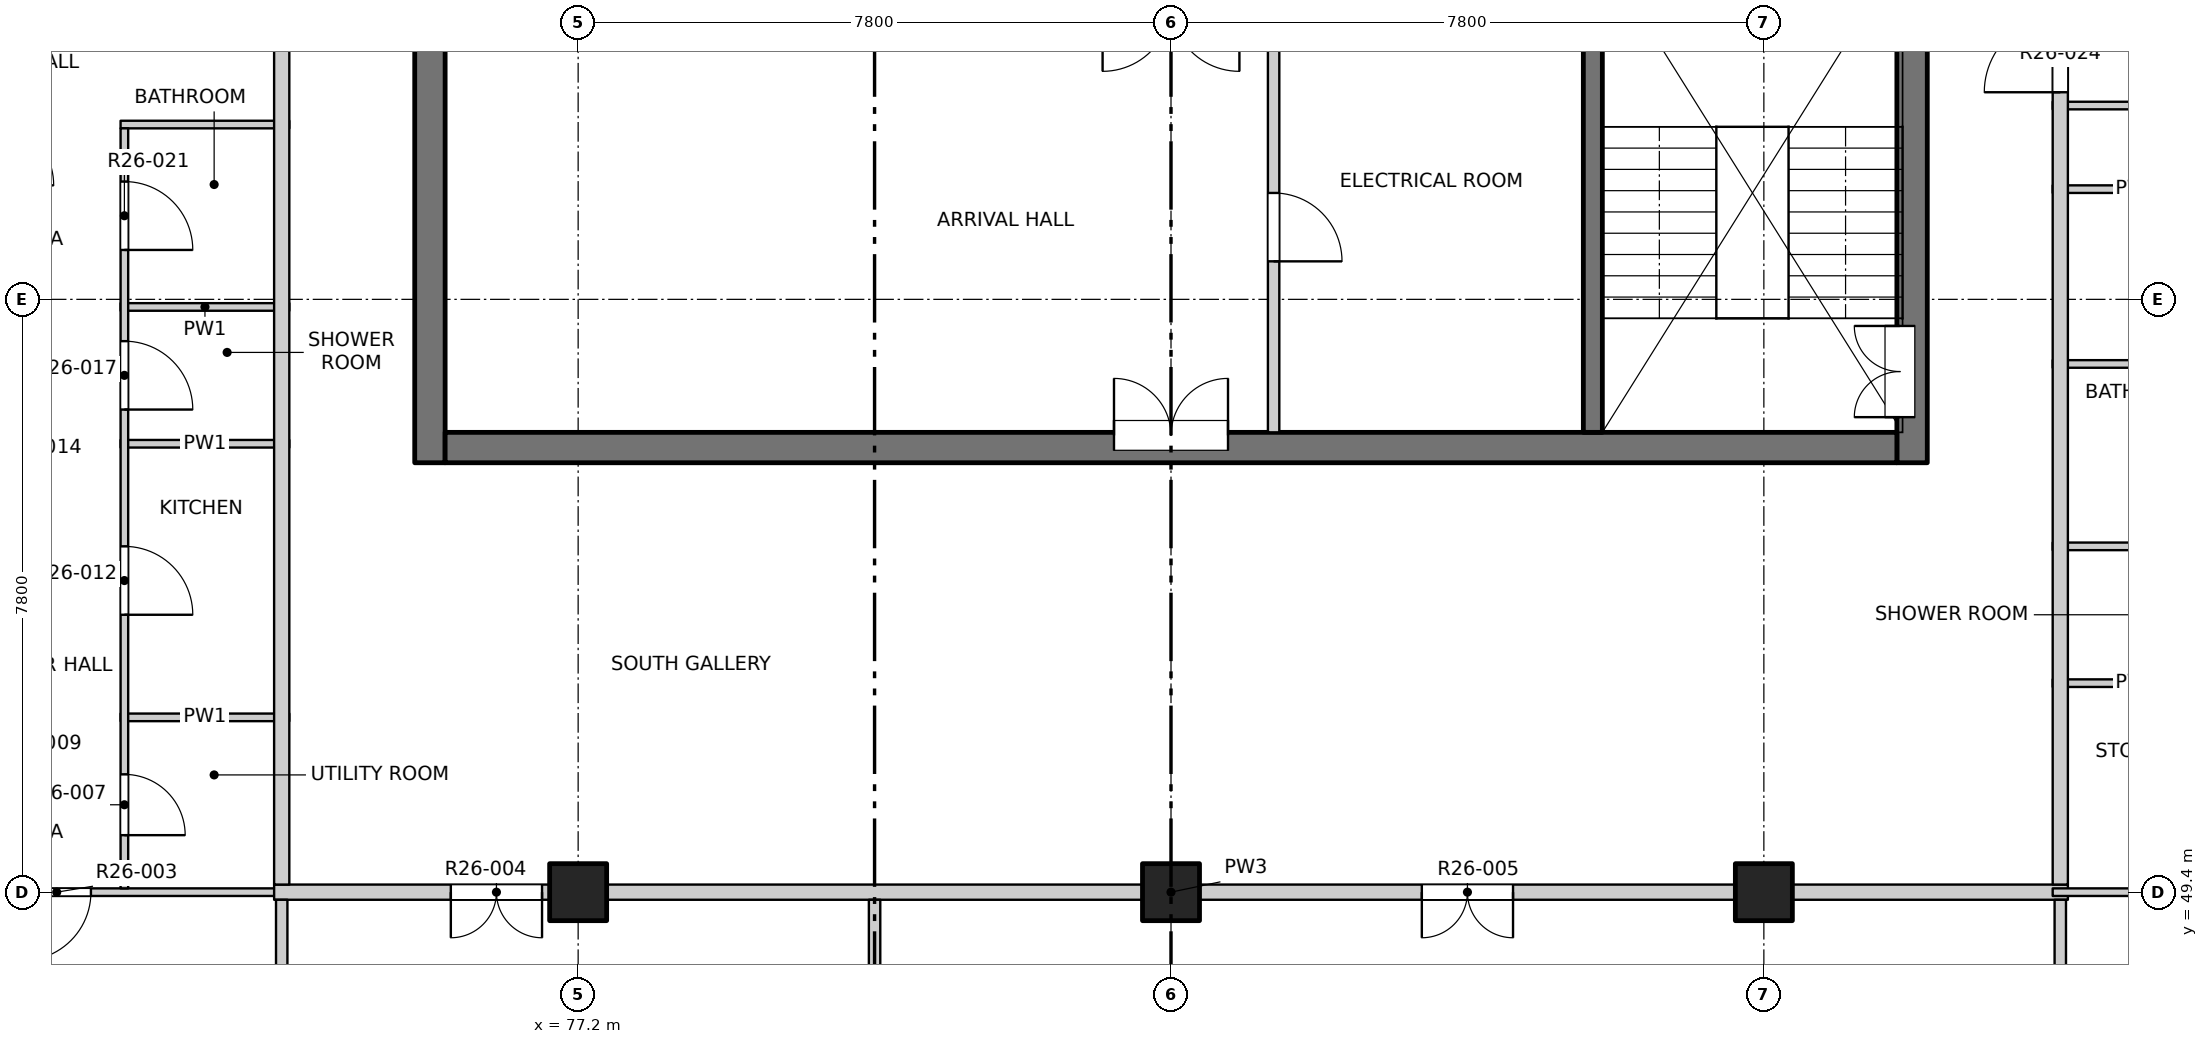
"""IFC4 building model, lengths in metres.
Left out: names, types, materials, properties, quantities, classifications, styles, units other than length and angle.
Written with IfcOpenShell. Run it as: python <this file> out.ifc"""

import sys

from ifc_helpers import new_model, si_unit, direction, frame, frame_2d, origin, origin_2d, place, context, subcontext, project, spatial, rectangle, extrude, element, fill, save


model = new_model("IFC4")
c1 = context("Model", 3, precision=1e-05, world=origin(), true_north=direction((0.0, 1.0)))
c2 = subcontext(c1, "Body", "Model", "MODEL_VIEW")
j1 = project(units=[si_unit("LENGTHUNIT", "METRE"), si_unit("PLANEANGLEUNIT", "RADIAN")], contexts=[c1])
p1 = place(None, origin())
s1 = spatial("IfcSite", under=j1, at=p1, CompositionType="ELEMENT")
p2 = place(p1, origin())
s2 = spatial("IfcBuilding", under=s1, at=p2, CompositionType="ELEMENT")
p3 = place(p2, frame((0.0, 0.0, 259.6)))
s3 = spatial("IfcBuildingStorey", under=s2, at=p3, CompositionType="ELEMENT", Elevation=259.6)
for number, where, z_axis, x_axis in (
    (1, (77.2, 49.4, -0.25), (0.0, 0.0, 1.0), (1.0, 0.0, 0.0)),
    (2, (85.0, 49.4, -0.25), (0.0, 0.0, 1.0), (1.0, 0.0, 0.0)),
    (3, (92.8, 49.4, -0.25), (0.0, 0.0, 1.0), (1.0, 0.0, 0.0)),
):
    element("IfcColumn", number, at=place(p3, frame(where, z_axis=z_axis, x_axis=x_axis)), inside=s3, PredefinedType="COLUMN", context=c2, shape_type="SweptSolid", body=[
        extrude(rectangle(XDim=0.75, YDim=0.75, at=origin_2d()), origin(), (0.0, 0.0, 1.0), 3.4),
    ])
p4 = place(p3, frame((75.25, 55.05, -0.25), z_axis=(0.0, 0.0, 1.0), x_axis=(0.0, 1.0, 0.0)))
e4 = element("IfcWall", 4, at=p4, inside=s3, PredefinedType="SOLIDWALL", context=c2, shape_type="SweptSolid", body=[
    extrude(rectangle(XDim=22.25, YDim=0.4, at=frame_2d((11.125, 0.0))), origin(), (0.0, 0.0, 1.0), 3.4),
])
p5 = place(p4, frame((7.4, 0.0, 0.25)))
e5 = element("IfcOpeningElement", 5, at=p5, cuts=e4, PredefinedType="OPENING", context=c2, shape_type="SweptSolid", body=[
    extrude(rectangle(XDim=0.9, YDim=2.1, at=frame_2d((0.45, 1.05))), frame((0.0, 0.21, 0.0), z_axis=(0.0, -1.0, 0.0), x_axis=(1.0, 0.0, 0.0)), (0.0, 0.0, 1.0), 0.42),
])
p6 = place(p4, frame((10.7, 0.0, 0.25)))
e6 = element("IfcOpeningElement", 6, at=p6, cuts=e4, PredefinedType="OPENING", context=c2, shape_type="SweptSolid", body=[
    extrude(rectangle(XDim=0.9, YDim=2.1, at=frame_2d((0.45, 1.05))), frame((0.0, 0.21, 0.0), z_axis=(0.0, -1.0, 0.0), x_axis=(1.0, 0.0, 0.0)), (0.0, 0.0, 1.0), 0.42),
])
p7 = place(p4, frame((15.2, 0.0, 0.25)))
e7 = element("IfcOpeningElement", 7, at=p7, cuts=e4, PredefinedType="OPENING", context=c2, shape_type="SweptSolid", body=[
    extrude(rectangle(XDim=0.9, YDim=2.1, at=frame_2d((0.45, 1.05))), frame((0.0, 0.21, 0.0), z_axis=(0.0, -1.0, 0.0), x_axis=(1.0, 0.0, 0.0)), (0.0, 0.0, 1.0), 0.42),
])
p8 = place(p4, frame((20.0, 0.0, 0.25)))
e8 = element("IfcOpeningElement", 8, at=p8, cuts=e4, PredefinedType="OPENING", context=c2, shape_type="SweptSolid", body=[
    extrude(rectangle(XDim=0.9, YDim=2.1, at=frame_2d((0.45, 1.05))), frame((0.0, 0.21, 0.0), z_axis=(0.0, -1.0, 0.0), x_axis=(1.0, 0.0, 0.0)), (0.0, 0.0, 1.0), 0.42),
])
p9 = place(p3, frame((94.75, 55.05, -0.25), z_axis=(0.0, 0.0, 1.0), x_axis=(0.0, 1.0, 0.0)))
e9 = element("IfcWall", 9, at=p9, inside=s3, PredefinedType="SOLIDWALL", context=c2, shape_type="SweptSolid", body=[
    extrude(rectangle(XDim=6.9, YDim=0.4, at=frame_2d((3.45, 0.0))), origin(), (0.0, 0.0, 1.0), 3.4),
])
p10 = place(p9, frame((0.6, 0.0, 0.25)))
e10 = element("IfcOpeningElement", 10, at=p10, cuts=e9, PredefinedType="OPENING", context=c2, shape_type="SweptSolid", body=[
    extrude(rectangle(XDim=1.2, YDim=2.1, at=frame_2d((0.6, 1.05))), frame((0.0, 0.21, 0.0), z_axis=(0.0, -1.0, 0.0), x_axis=(1.0, 0.0, 0.0)), (0.0, 0.0, 1.0), 0.42),
])
p11 = place(p3, frame((75.45, 55.25, -0.25), z_axis=(0.0, 0.0, 1.0), x_axis=(1.0, 0.0, 0.0)))
e11 = element("IfcWall", 11, at=p11, inside=s3, PredefinedType="SOLIDWALL", context=c2, shape_type="SweptSolid", body=[
    extrude(rectangle(XDim=19.1, YDim=0.4, at=frame_2d((9.55, 0.0))), origin(), (0.0, 0.0, 1.0), 3.4),
])
p12 = place(p11, frame((8.8, 0.0, 0.25)))
e12 = element("IfcOpeningElement", 12, at=p12, cuts=e11, PredefinedType="OPENING", context=c2, shape_type="SweptSolid", body=[
    extrude(rectangle(XDim=1.5, YDim=2.1, at=frame_2d((0.75, 1.05))), frame((0.0, 0.21, 0.0), z_axis=(0.0, -1.0, 0.0), x_axis=(1.0, 0.0, 0.0)), (0.0, 0.0, 1.0), 0.42),
])
p13 = place(p3, frame((90.55, 55.45, -0.25), z_axis=(0.0, 0.0, 1.0), x_axis=(0.0, 1.0, 0.0)))
e13 = element("IfcWall", 13, at=p13, inside=s3, PredefinedType="SOLIDWALL", context=c2, shape_type="SweptSolid", body=[
    extrude(rectangle(XDim=6.5, YDim=0.25, at=frame_2d((3.25, 0.0))), origin(), (0.0, 0.0, 1.0), 3.4),
])
p14 = place(p3, frame((65.8, 49.4, 0.0), z_axis=(0.0, 0.0, 1.0), x_axis=(1.0, 0.0, 0.0)))
e14 = element("IfcWall", 14, at=p14, inside=s3, PredefinedType="PARTITIONING", context=c2, shape_type="SweptSolid", body=[
    extrude(rectangle(XDim=7.6, YDim=0.1, at=frame_2d((3.8, 0.0))), origin(), (0.0, 0.0, 1.0), 3.15),
])
p15 = place(p14, frame((4.09, 0.0, 0.0)))
e15 = element("IfcOpeningElement", 15, at=p15, cuts=e14, PredefinedType="OPENING", context=c2, shape_type="SweptSolid", body=[
    extrude(rectangle(XDim=0.9, YDim=2.1, at=frame_2d((0.45, 1.05))), frame((0.0, 0.06, 0.0), z_axis=(0.0, -1.0, 0.0), x_axis=(1.0, 0.0, 0.0)), (0.0, 0.0, 1.0), 0.12),
])
p16 = place(p3, frame((73.2, 49.4, 0.0), z_axis=(0.0, 0.0, 1.0), x_axis=(1.0, 0.0, 0.0)))
e16 = element("IfcWall", 16, at=p16, inside=s3, PredefinedType="PARTITIONING", context=c2, shape_type="SweptSolid", body=[
    extrude(rectangle(XDim=23.6, YDim=0.2, at=frame_2d((11.8, 0.0))), origin(), (0.0, 0.0, 1.0), 3.15),
])
p17 = place(p16, frame((2.325, 0.0, 0.0)))
e17 = element("IfcOpeningElement", 17, at=p17, cuts=e16, PredefinedType="OPENING", context=c2, shape_type="SweptSolid", body=[
    extrude(rectangle(XDim=1.2, YDim=2.1, at=frame_2d((0.6, 1.05))), frame((0.0, 0.11, 0.0), z_axis=(0.0, -1.0, 0.0), x_axis=(1.0, 0.0, 0.0)), (0.0, 0.0, 1.0), 0.22),
])
p18 = place(p16, frame((15.1, 0.0, 0.0)))
e18 = element("IfcOpeningElement", 18, at=p18, cuts=e16, PredefinedType="OPENING", context=c2, shape_type="SweptSolid", body=[
    extrude(rectangle(XDim=1.2, YDim=2.1, at=frame_2d((0.6, 1.05))), frame((0.0, 0.11, 0.0), z_axis=(0.0, -1.0, 0.0), x_axis=(1.0, 0.0, 0.0)), (0.0, 0.0, 1.0), 0.22),
])
p19 = place(p3, frame((96.6, 49.4, 0.0), z_axis=(0.0, 0.0, 1.0), x_axis=(1.0, 0.0, 0.0)))
e19 = element("IfcWall", 19, at=p19, inside=s3, PredefinedType="PARTITIONING", context=c2, shape_type="SweptSolid", body=[
    extrude(rectangle(XDim=7.6, YDim=0.1, at=frame_2d((3.8, 0.0))), origin(), (0.0, 0.0, 1.0), 3.15),
])
p20 = place(p19, frame((2.61, 0.0, 0.0)))
e20 = element("IfcOpeningElement", 20, at=p20, cuts=e19, PredefinedType="OPENING", context=c2, shape_type="SweptSolid", body=[
    extrude(rectangle(XDim=0.9, YDim=2.1, at=frame_2d((0.45, 1.05))), frame((0.0, 0.06, 0.0), z_axis=(0.0, -1.0, 0.0), x_axis=(1.0, 0.0, 0.0)), (0.0, 0.0, 1.0), 0.12),
])
for number, where, z_axis, x_axis in (
    (21, (71.18, 51.7, 0.0), (0.0, 0.0, 1.0), (1.0, 0.0, 0.0)),
    (22, (96.6, 52.15, 0.0), (0.0, 0.0, 1.0), (1.0, 0.0, 0.0)),
    (23, (96.6, 53.95, 0.0), (0.0, 0.0, 1.0), (1.0, 0.0, 0.0)),
    (24, (71.18, 55.3, 0.0), (0.0, 0.0, 1.0), (1.0, 0.0, 0.0)),
    (25, (96.6, 56.35, 0.0), (0.0, 0.0, 1.0), (1.0, 0.0, 0.0)),
    (26, (71.18, 57.1, 0.0), (0.0, 0.0, 1.0), (1.0, 0.0, 0.0)),
    (27, (96.6, 58.65, 0.0), (0.0, 0.0, 1.0), (1.0, 0.0, 0.0)),
    (28, (71.18, 59.5, 0.0), (0.0, 0.0, 1.0), (1.0, 0.0, 0.0)),
    (29, (96.6, 59.75, 0.0), (0.0, 0.0, 1.0), (1.0, 0.0, 0.0)),
):
    element("IfcWall", number, at=place(p3, frame(where, z_axis=z_axis, x_axis=x_axis)), inside=s3, PredefinedType="PARTITIONING", context=c2, shape_type="SweptSolid", body=[
        extrude(rectangle(XDim=2.22, YDim=0.1, at=frame_2d((1.11, 0.0))), origin(), (0.0, 0.0, 1.0), 3.15),
    ])
p21 = place(p3, frame((71.23, 49.45, 0.0), z_axis=(0.0, 0.0, 1.0), x_axis=(0.0, 1.0, 0.0)))
e30 = element("IfcWall", 30, at=p21, inside=s3, PredefinedType="PARTITIONING", context=c2, shape_type="SweptSolid", body=[
    extrude(rectangle(XDim=10.0, YDim=0.1, at=frame_2d((5.0, 0.0))), origin(), (0.0, 0.0, 1.0), 3.15),
])
p22 = place(p21, frame((0.7, 0.0, 0.0)))
e31 = element("IfcOpeningElement", 31, at=p22, cuts=e30, PredefinedType="OPENING", context=c2, shape_type="SweptSolid", body=[
    extrude(rectangle(XDim=0.8, YDim=2.1, at=frame_2d((0.4, 1.05))), frame((0.0, 0.06, 0.0), z_axis=(0.0, -1.0, 0.0), x_axis=(1.0, 0.0, 0.0)), (0.0, 0.0, 1.0), 0.12),
])
p23 = place(p21, frame((3.6, 0.0, 0.0)))
e32 = element("IfcOpeningElement", 32, at=p23, cuts=e30, PredefinedType="OPENING", context=c2, shape_type="SweptSolid", body=[
    extrude(rectangle(XDim=0.9, YDim=2.1, at=frame_2d((0.45, 1.05))), frame((0.0, 0.06, 0.0), z_axis=(0.0, -1.0, 0.0), x_axis=(1.0, 0.0, 0.0)), (0.0, 0.0, 1.0), 0.12),
])
p24 = place(p21, frame((6.3, 0.0, 0.0)))
e33 = element("IfcOpeningElement", 33, at=p24, cuts=e30, PredefinedType="OPENING", context=c2, shape_type="SweptSolid", body=[
    extrude(rectangle(XDim=0.9, YDim=2.1, at=frame_2d((0.45, 1.05))), frame((0.0, 0.06, 0.0), z_axis=(0.0, -1.0, 0.0), x_axis=(1.0, 0.0, 0.0)), (0.0, 0.0, 1.0), 0.12),
])
p25 = place(p21, frame((8.4, 0.0, 0.0)))
e34 = element("IfcOpeningElement", 34, at=p25, cuts=e30, PredefinedType="OPENING", context=c2, shape_type="SweptSolid", body=[
    extrude(rectangle(XDim=0.9, YDim=2.1, at=frame_2d((0.45, 1.05))), frame((0.0, 0.06, 0.0), z_axis=(0.0, -1.0, 0.0), x_axis=(1.0, 0.0, 0.0)), (0.0, 0.0, 1.0), 0.12),
])
p26 = place(p3, frame((73.3, 45.8, 0.0), z_axis=(0.0, 0.0, 1.0), x_axis=(0.0, 1.0, 0.0)))
e35 = element("IfcWall", 35, at=p26, inside=s3, PredefinedType="PARTITIONING", context=c2, shape_type="SweptSolid", body=[
    extrude(rectangle(XDim=3.5, YDim=0.15, at=frame_2d((1.75, 0.0))), origin(), (0.0, 0.0, 1.0), 3.15),
])
p27 = place(p3, frame((73.3, 49.5, 0.0), z_axis=(0.0, 0.0, 1.0), x_axis=(0.0, 1.0, 0.0)))
e36 = element("IfcWall", 36, at=p27, inside=s3, PredefinedType="PARTITIONING", context=c2, shape_type="SweptSolid", body=[
    extrude(rectangle(XDim=34.7, YDim=0.2, at=frame_2d((17.35, 0.0))), origin(), (0.0, 0.0, 1.0), 3.15),
])
p28 = place(p27, frame((11.275, 0.0, 0.0)))
e37 = element("IfcOpeningElement", 37, at=p28, cuts=e36, PredefinedType="OPENING", context=c2, shape_type="SweptSolid", body=[
    extrude(rectangle(XDim=1.0, YDim=2.1, at=frame_2d((0.5, 1.05))), frame((0.0, 0.11, 0.0), z_axis=(0.0, -1.0, 0.0), x_axis=(1.0, 0.0, 0.0)), (0.0, 0.0, 1.0), 0.22),
])
p29 = place(p27, frame((29.125, 0.0, 0.0)))
e38 = element("IfcOpeningElement", 38, at=p29, cuts=e36, PredefinedType="OPENING", context=c2, shape_type="SweptSolid", body=[
    extrude(rectangle(XDim=1.0, YDim=2.1, at=frame_2d((0.5, 1.05))), frame((0.0, 0.11, 0.0), z_axis=(0.0, -1.0, 0.0), x_axis=(1.0, 0.0, 0.0)), (0.0, 0.0, 1.0), 0.22),
])
p30 = place(p3, frame((81.1, 45.8, 0.0), z_axis=(0.0, 0.0, 1.0), x_axis=(0.0, 1.0, 0.0)))
e39 = element("IfcWall", 39, at=p30, inside=s3, PredefinedType="PARTITIONING", context=c2, shape_type="SweptSolid", body=[
    extrude(rectangle(XDim=3.5, YDim=0.15, at=frame_2d((1.75, 0.0))), origin(), (0.0, 0.0, 1.0), 3.15),
])
p31 = place(p3, frame((86.35, 55.45, 0.0), z_axis=(0.0, 0.0, 1.0), x_axis=(0.0, 1.0, 0.0)))
e40 = element("IfcWall", 40, at=p31, inside=s3, PredefinedType="PARTITIONING", context=c2, shape_type="SweptSolid", body=[
    extrude(rectangle(XDim=5.575, YDim=0.15, at=frame_2d((2.788, 0.0))), origin(), (0.0, 0.0, 1.0), 3.15),
])
p32 = place(p31, frame((2.25, 0.0, 0.0)))
e41 = element("IfcOpeningElement", 41, at=p32, cuts=e40, PredefinedType="OPENING", context=c2, shape_type="SweptSolid", body=[
    extrude(rectangle(XDim=0.9, YDim=2.1, at=frame_2d((0.45, 1.05))), frame((0.0, 0.085, 0.0), z_axis=(0.0, -1.0, 0.0), x_axis=(1.0, 0.0, 0.0)), (0.0, 0.0, 1.0), 0.17),
])
p33 = place(p3, frame((96.7, 45.8, 0.0), z_axis=(0.0, 0.0, 1.0), x_axis=(0.0, 1.0, 0.0)))
e42 = element("IfcWall", 42, at=p33, inside=s3, PredefinedType="PARTITIONING", context=c2, shape_type="SweptSolid", body=[
    extrude(rectangle(XDim=3.5, YDim=0.15, at=frame_2d((1.75, 0.0))), origin(), (0.0, 0.0, 1.0), 3.15),
])
p34 = place(p3, frame((96.7, 49.5, 0.0), z_axis=(0.0, 0.0, 1.0), x_axis=(0.0, 1.0, 0.0)))
e43 = element("IfcWall", 43, at=p34, inside=s3, PredefinedType="PARTITIONING", context=c2, shape_type="SweptSolid", body=[
    extrude(rectangle(XDim=34.7, YDim=0.2, at=frame_2d((17.35, 0.0))), origin(), (0.0, 0.0, 1.0), 3.15),
])
p35 = place(p34, frame((10.425, 0.0, 0.0)))
e44 = element("IfcOpeningElement", 44, at=p35, cuts=e43, PredefinedType="OPENING", context=c2, shape_type="SweptSolid", body=[
    extrude(rectangle(XDim=1.0, YDim=2.1, at=frame_2d((0.5, 1.05))), frame((0.0, 0.11, 0.0), z_axis=(0.0, -1.0, 0.0), x_axis=(1.0, 0.0, 0.0)), (0.0, 0.0, 1.0), 0.22),
])
p36 = place(p34, frame((29.225, 0.0, 0.0)))
e45 = element("IfcOpeningElement", 45, at=p36, cuts=e43, PredefinedType="OPENING", context=c2, shape_type="SweptSolid", body=[
    extrude(rectangle(XDim=1.0, YDim=2.1, at=frame_2d((0.5, 1.05))), frame((0.0, 0.11, 0.0), z_axis=(0.0, -1.0, 0.0), x_axis=(1.0, 0.0, 0.0)), (0.0, 0.0, 1.0), 0.22),
])
p37 = place(p15, origin())
e46 = element("IfcDoor", 46, at=p37, inside=s3, OperationType="SINGLE_SWING_RIGHT", PredefinedType="DOOR", context=c2, shape_type="SweptSolid", body=[
    extrude(rectangle(XDim=0.9, YDim=2.1, at=frame_2d((0.45, 1.05))), frame((0.0, 0.025, 0.0), z_axis=(0.0, -1.0, 0.0), x_axis=(1.0, 0.0, 0.0)), (0.0, 0.0, 1.0), 0.05),
])
fill(e15, e46)
p38 = place(p17, origin())
e47 = element("IfcDoor", 47, at=p38, inside=s3, OperationType="DOUBLE_DOOR_SINGLE_SWING", PredefinedType="DOOR", context=c2, shape_type="SweptSolid", body=[
    extrude(rectangle(XDim=1.2, YDim=2.1, at=frame_2d((0.6, 1.05))), frame((0.0, 0.025, 0.0), z_axis=(0.0, -1.0, 0.0), x_axis=(1.0, 0.0, 0.0)), (0.0, 0.0, 1.0), 0.05),
])
fill(e17, e47)
p39 = place(p18, origin())
e48 = element("IfcDoor", 48, at=p39, inside=s3, OperationType="DOUBLE_DOOR_SINGLE_SWING", PredefinedType="DOOR", context=c2, shape_type="SweptSolid", body=[
    extrude(rectangle(XDim=1.2, YDim=2.1, at=frame_2d((0.6, 1.05))), frame((0.0, 0.025, 0.0), z_axis=(0.0, -1.0, 0.0), x_axis=(1.0, 0.0, 0.0)), (0.0, 0.0, 1.0), 0.05),
])
fill(e18, e48)
p40 = place(p22, origin())
e49 = element("IfcDoor", 49, at=p40, inside=s3, OperationType="SINGLE_SWING_RIGHT", PredefinedType="DOOR", context=c2, shape_type="SweptSolid", body=[
    extrude(rectangle(XDim=0.8, YDim=2.1, at=frame_2d((0.4, 1.05))), frame((0.0, 0.025, 0.0), z_axis=(0.0, -1.0, 0.0), x_axis=(1.0, 0.0, 0.0)), (0.0, 0.0, 1.0), 0.05),
])
fill(e31, e49)
p41 = place(p23, origin())
e50 = element("IfcDoor", 50, at=p41, inside=s3, OperationType="SINGLE_SWING_RIGHT", PredefinedType="DOOR", context=c2, shape_type="SweptSolid", body=[
    extrude(rectangle(XDim=0.9, YDim=2.1, at=frame_2d((0.45, 1.05))), frame((0.0, 0.025, 0.0), z_axis=(0.0, -1.0, 0.0), x_axis=(1.0, 0.0, 0.0)), (0.0, 0.0, 1.0), 0.05),
])
fill(e32, e50)
p42 = place(p12, origin())
e51 = element("IfcDoor", 51, at=p42, inside=s3, OperationType="DOUBLE_DOOR_SINGLE_SWING", PredefinedType="DOOR", context=c2, shape_type="SweptSolid", body=[
    extrude(rectangle(XDim=1.5, YDim=2.1, at=frame_2d((0.75, 1.05))), frame((0.0, 0.185, 0.0), z_axis=(0.0, -1.0, 0.0), x_axis=(1.0, 0.0, 0.0)), (0.0, 0.0, 1.0), 0.05),
])
fill(e12, e51)
p43 = place(p24, origin())
e52 = element("IfcDoor", 52, at=p43, inside=s3, OperationType="SINGLE_SWING_RIGHT", PredefinedType="DOOR", context=c2, shape_type="SweptSolid", body=[
    extrude(rectangle(XDim=0.9, YDim=2.1, at=frame_2d((0.45, 1.05))), frame((0.0, 0.025, 0.0), z_axis=(0.0, -1.0, 0.0), x_axis=(1.0, 0.0, 0.0)), (0.0, 0.0, 1.0), 0.05),
])
fill(e33, e52)
p44 = place(p10, origin())
e53 = element("IfcDoor", 53, at=p44, inside=s3, OperationType="DOUBLE_DOOR_SINGLE_SWING", PredefinedType="DOOR", context=c2, shape_type="SweptSolid", body=[
    extrude(rectangle(XDim=1.2, YDim=2.1, at=frame_2d((0.6, 1.05))), frame((0.0, 0.185, 0.0), z_axis=(0.0, -1.0, 0.0), x_axis=(1.0, 0.0, 0.0)), (0.0, 0.0, 1.0), 0.05),
])
fill(e10, e53)
p45 = place(p32, origin())
e54 = element("IfcDoor", 54, at=p45, inside=s3, OperationType="SINGLE_SWING_RIGHT", PredefinedType="DOOR", context=c2, shape_type="SweptSolid", body=[
    extrude(rectangle(XDim=0.9, YDim=2.1, at=frame_2d((0.45, 1.05))), frame((0.0, 0.025, 0.0), z_axis=(0.0, -1.0, 0.0), x_axis=(1.0, 0.0, 0.0)), (0.0, 0.0, 1.0), 0.05),
])
fill(e41, e54)
p46 = place(p25, origin())
e55 = element("IfcDoor", 55, at=p46, inside=s3, OperationType="SINGLE_SWING_RIGHT", PredefinedType="DOOR", context=c2, shape_type="SweptSolid", body=[
    extrude(rectangle(XDim=0.9, YDim=2.1, at=frame_2d((0.45, 1.05))), frame((0.0, 0.025, 0.0), z_axis=(0.0, -1.0, 0.0), x_axis=(1.0, 0.0, 0.0)), (0.0, 0.0, 1.0), 0.05),
])
fill(e34, e55)
p47 = place(p35, origin())
e56 = element("IfcDoor", 56, at=p47, inside=s3, OperationType="SINGLE_SWING_LEFT", PredefinedType="DOOR", context=c2, shape_type="SweptSolid", body=[
    extrude(rectangle(XDim=1.0, YDim=2.1, at=frame_2d((0.5, 1.05))), frame((0.0, 0.025, 0.0), z_axis=(0.0, -1.0, 0.0), x_axis=(1.0, 0.0, 0.0)), (0.0, 0.0, 1.0), 0.05),
])
fill(e44, e56)
save(model, sys.argv[1])
